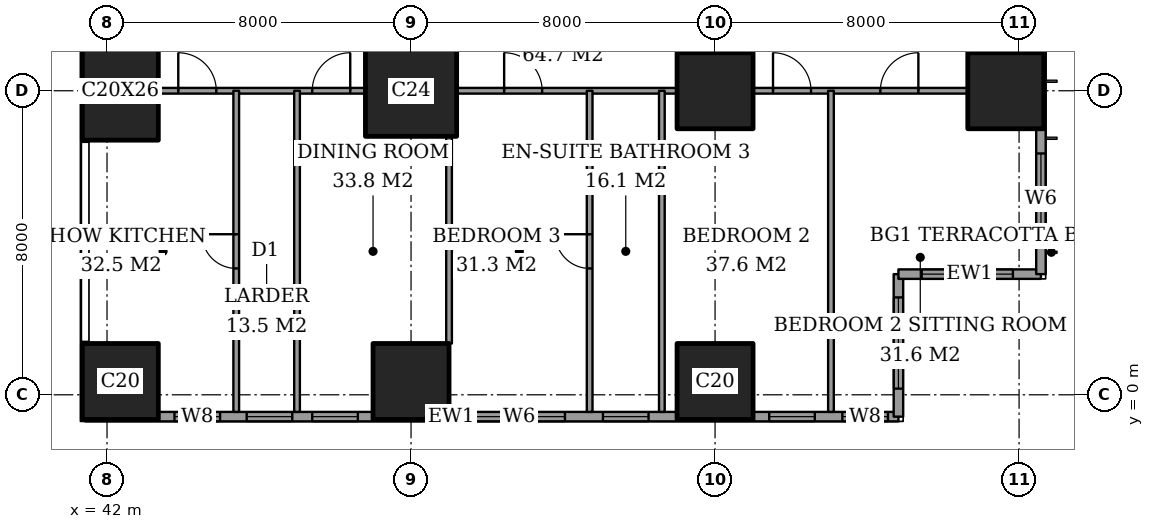
"""IFC4 building model, lengths in metres.
Left out: names, types, materials, properties, quantities, classifications, styles, units other than length and angle.
Written with IfcOpenShell. Run it as: python <this file> out.ifc"""

import sys

from ifc_helpers import new_model, si_unit, direction, frame, frame_2d, origin, origin_2d, place, context, subcontext, project, spatial, rectangle, extrude, element, fill, save


model = new_model("IFC4")
c1 = context("Model", 3, precision=1e-05, world=origin(), true_north=direction((0.0, 1.0)))
c2 = subcontext(c1, "Body", "Model", "MODEL_VIEW")
j1 = project(units=[si_unit("LENGTHUNIT", "METRE"), si_unit("PLANEANGLEUNIT", "RADIAN")], contexts=[c1])
p1 = place(None, origin())
s1 = spatial("IfcSite", under=j1, at=p1, CompositionType="ELEMENT")
p2 = place(p1, origin())
s2 = spatial("IfcBuilding", under=s1, at=p2, CompositionType="ELEMENT")
p3 = place(p2, frame((0.0, 0.0, 80.0)))
s3 = spatial("IfcBuildingStorey", under=s2, at=p3, CompositionType="ELEMENT", Elevation=80.0)
p4 = place(p3, frame((42.35, 0.35, 0.0), z_axis=(0.0, 0.0, 1.0), x_axis=(1.0, 0.0, 0.0)))
e1 = element("IfcColumn", 1, at=p4, inside=s3, PredefinedType="COLUMN", context=c2, shape_type="SweptSolid", body=[
    extrude(rectangle(XDim=2.0, YDim=2.0, at=origin_2d()), origin(), (0.0, 0.0, 1.0), 3.6),
])
p5 = place(p3, frame((42.35, 8.0, 0.0), z_axis=(0.0, 0.0, 1.0), x_axis=(1.0, 0.0, 0.0)))
e2 = element("IfcColumn", 2, at=p5, inside=s3, PredefinedType="COLUMN", context=c2, shape_type="SweptSolid", body=[
    extrude(rectangle(XDim=2.0, YDim=2.6, at=origin_2d()), origin(), (0.0, 0.0, 1.0), 3.6),
])
p6 = place(p3, frame((50.0, 0.35, 0.0), z_axis=(0.0, 0.0, 1.0), x_axis=(1.0, 0.0, 0.0)))
e3 = element("IfcColumn", 3, at=p6, inside=s3, PredefinedType="COLUMN", context=c2, shape_type="SweptSolid", body=[
    extrude(rectangle(XDim=2.0, YDim=2.0, at=origin_2d()), origin(), (0.0, 0.0, 1.0), 3.6),
])
p7 = place(p3, frame((50.0, 8.0, 0.0), z_axis=(0.0, 0.0, 1.0), x_axis=(1.0, 0.0, 0.0)))
e4 = element("IfcColumn", 4, at=p7, inside=s3, PredefinedType="COLUMN", context=c2, shape_type="SweptSolid", body=[
    extrude(rectangle(XDim=2.4, YDim=2.4, at=origin_2d()), origin(), (0.0, 0.0, 1.0), 3.6),
])
for number, where, z_axis, x_axis in (
    (5, (58.0, 0.35, 0.0), (0.0, 0.0, 1.0), (1.0, 0.0, 0.0)),
    (6, (58.0, 8.0, 0.0), (0.0, 0.0, 1.0), (1.0, 0.0, 0.0)),
    (7, (65.65, 8.0, 0.0), (0.0, 0.0, 1.0), (1.0, 0.0, 0.0)),
):
    element("IfcColumn", number, at=place(p3, frame(where, z_axis=z_axis, x_axis=x_axis)), inside=s3, PredefinedType="COLUMN", context=c2, shape_type="SweptSolid", body=[
        extrude(rectangle(XDim=2.0, YDim=2.0, at=origin_2d()), origin(), (0.0, 0.0, 1.0), 3.6),
    ])
p8 = place(p3, frame((41.425, -0.575, 0.0), z_axis=(0.0, 0.0, 1.0), x_axis=(1.0, 0.0, 0.0)))
e8 = element("IfcWall", 8, at=p8, inside=s3, PredefinedType="SOLIDWALL", context=c2, shape_type="SweptSolid", body=[
    extrude(rectangle(XDim=21.4, YDim=0.25, at=frame_2d((10.7, 0.0))), origin(), (0.0, 0.0, 1.0), 3.6),
])
p9 = place(p8, frame((2.35, 0.0, 0.6)))
e9 = element("IfcOpeningElement", 9, at=p9, cuts=e8, PredefinedType="OPENING", context=c2, shape_type="SweptSolid", body=[
    extrude(rectangle(XDim=1.2, YDim=2.0, at=frame_2d((0.6, 1.0))), frame((0.0, 0.135, 0.0), z_axis=(0.0, -1.0, 0.0), x_axis=(1.0, 0.0, 0.0)), (0.0, 0.0, 1.0), 0.27),
])
p10 = place(p8, frame((4.25, 0.0, 0.6)))
e10 = element("IfcOpeningElement", 10, at=p10, cuts=e8, PredefinedType="OPENING", context=c2, shape_type="SweptSolid", body=[
    extrude(rectangle(XDim=1.2, YDim=2.0, at=frame_2d((0.6, 1.0))), frame((0.0, 0.135, 0.0), z_axis=(0.0, -1.0, 0.0), x_axis=(1.0, 0.0, 0.0)), (0.0, 0.0, 1.0), 0.27),
])
p11 = place(p8, frame((5.975, 0.0, 0.6)))
e11 = element("IfcOpeningElement", 11, at=p11, cuts=e8, PredefinedType="OPENING", context=c2, shape_type="SweptSolid", body=[
    extrude(rectangle(XDim=1.2, YDim=2.0, at=frame_2d((0.6, 1.0))), frame((0.0, 0.135, 0.0), z_axis=(0.0, -1.0, 0.0), x_axis=(1.0, 0.0, 0.0)), (0.0, 0.0, 1.0), 0.27),
])
p12 = place(p8, frame((10.225, 0.0, 0.6)))
e12 = element("IfcOpeningElement", 12, at=p12, cuts=e8, PredefinedType="OPENING", context=c2, shape_type="SweptSolid", body=[
    extrude(rectangle(XDim=2.4, YDim=2.0, at=frame_2d((1.2, 1.0))), frame((0.0, 0.135, 0.0), z_axis=(0.0, -1.0, 0.0), x_axis=(1.0, 0.0, 0.0)), (0.0, 0.0, 1.0), 0.27),
])
p13 = place(p8, frame((13.625, 0.0, 0.6)))
e13 = element("IfcOpeningElement", 13, at=p13, cuts=e8, PredefinedType="OPENING", context=c2, shape_type="SweptSolid", body=[
    extrude(rectangle(XDim=1.2, YDim=2.0, at=frame_2d((0.6, 1.0))), frame((0.0, 0.135, 0.0), z_axis=(0.0, -1.0, 0.0), x_axis=(1.0, 0.0, 0.0)), (0.0, 0.0, 1.0), 0.27),
])
p14 = place(p8, frame((18.0, 0.0, 0.6)))
e14 = element("IfcOpeningElement", 14, at=p14, cuts=e8, PredefinedType="OPENING", context=c2, shape_type="SweptSolid", body=[
    extrude(rectangle(XDim=1.2, YDim=2.0, at=frame_2d((0.6, 1.0))), frame((0.0, 0.135, 0.0), z_axis=(0.0, -1.0, 0.0), x_axis=(1.0, 0.0, 0.0)), (0.0, 0.0, 1.0), 0.27),
])
p15 = place(p8, frame((19.925, 0.0, 0.6)))
e15 = element("IfcOpeningElement", 15, at=p15, cuts=e8, PredefinedType="OPENING", context=c2, shape_type="SweptSolid", body=[
    extrude(rectangle(XDim=1.2, YDim=2.0, at=frame_2d((0.6, 1.0))), frame((0.0, 0.135, 0.0), z_axis=(0.0, -1.0, 0.0), x_axis=(1.0, 0.0, 0.0)), (0.0, 0.0, 1.0), 0.27),
])
p16 = place(p3, frame((62.825, -0.575, 0.0), z_axis=(0.0, 0.0, 1.0), x_axis=(0.0, 1.0, 0.0)))
e16 = element("IfcWall", 16, at=p16, inside=s3, PredefinedType="SOLIDWALL", context=c2, shape_type="SweptSolid", body=[
    extrude(rectangle(XDim=3.75, YDim=0.25, at=frame_2d((1.875, 0.0))), origin(), (0.0, 0.0, 1.0), 3.6),
])
p17 = place(p16, frame((0.738, 0.0, 0.6)))
e17 = element("IfcOpeningElement", 17, at=p17, cuts=e16, PredefinedType="OPENING", context=c2, shape_type="SweptSolid", body=[
    extrude(rectangle(XDim=2.4, YDim=2.0, at=frame_2d((1.2, 1.0))), frame((0.0, 0.135, 0.0), z_axis=(0.0, -1.0, 0.0), x_axis=(1.0, 0.0, 0.0)), (0.0, 0.0, 1.0), 0.27),
])
p18 = place(p3, frame((62.825, 3.175, 0.0), z_axis=(0.0, 0.0, 1.0), x_axis=(1.0, 0.0, 0.0)))
e18 = element("IfcWall", 18, at=p18, inside=s3, PredefinedType="SOLIDWALL", context=c2, shape_type="SweptSolid", body=[
    extrude(rectangle(XDim=3.75, YDim=0.25, at=frame_2d((1.875, 0.0))), origin(), (0.0, 0.0, 1.0), 3.6),
])
p19 = place(p18, frame((0.613, 0.0, 0.6)))
e19 = element("IfcOpeningElement", 19, at=p19, cuts=e18, PredefinedType="OPENING", context=c2, shape_type="SweptSolid", body=[
    extrude(rectangle(XDim=2.4, YDim=2.0, at=frame_2d((1.2, 1.0))), frame((0.0, 0.135, 0.0), z_axis=(0.0, -1.0, 0.0), x_axis=(1.0, 0.0, 0.0)), (0.0, 0.0, 1.0), 0.27),
])
p20 = place(p3, frame((66.575, 3.175, 0.0), z_axis=(0.0, 0.0, 1.0), x_axis=(0.0, 1.0, 0.0)))
e20 = element("IfcWall", 20, at=p20, inside=s3, PredefinedType="SOLIDWALL", context=c2, shape_type="SweptSolid", body=[
    extrude(rectangle(XDim=41.65, YDim=0.25, at=frame_2d((20.825, 0.0))), origin(), (0.0, 0.0, 1.0), 3.6),
])
p21 = place(p20, frame((0.775, 0.0, 0.6)))
e21 = element("IfcOpeningElement", 21, at=p21, cuts=e20, PredefinedType="OPENING", context=c2, shape_type="SweptSolid", body=[
    extrude(rectangle(XDim=2.4, YDim=2.0, at=frame_2d((1.2, 1.0))), frame((0.0, 0.135, 0.0), z_axis=(0.0, -1.0, 0.0), x_axis=(1.0, 0.0, 0.0)), (0.0, 0.0, 1.0), 0.27),
])
p22 = place(p20, frame((6.1, 0.0, 0.6)))
e22 = element("IfcOpeningElement", 22, at=p22, cuts=e20, PredefinedType="OPENING", context=c2, shape_type="SweptSolid", body=[
    extrude(rectangle(XDim=1.2, YDim=2.0, at=frame_2d((0.6, 1.0))), frame((0.0, 0.135, 0.0), z_axis=(0.0, -1.0, 0.0), x_axis=(1.0, 0.0, 0.0)), (0.0, 0.0, 1.0), 0.27),
])
p23 = place(p20, frame((8.275, 0.0, 0.6)))
e23 = element("IfcOpeningElement", 23, at=p23, cuts=e20, PredefinedType="OPENING", context=c2, shape_type="SweptSolid", body=[
    extrude(rectangle(XDim=2.4, YDim=2.0, at=frame_2d((1.2, 1.0))), frame((0.0, 0.135, 0.0), z_axis=(0.0, -1.0, 0.0), x_axis=(1.0, 0.0, 0.0)), (0.0, 0.0, 1.0), 0.27),
])
p24 = place(p20, frame((15.775, 0.0, 0.6)))
e24 = element("IfcOpeningElement", 24, at=p24, cuts=e20, PredefinedType="OPENING", context=c2, shape_type="SweptSolid", body=[
    extrude(rectangle(XDim=2.4, YDim=2.0, at=frame_2d((1.2, 1.0))), frame((0.0, 0.135, 0.0), z_axis=(0.0, -1.0, 0.0), x_axis=(1.0, 0.0, 0.0)), (0.0, 0.0, 1.0), 0.27),
])
p25 = place(p20, frame((23.475, 0.0, 0.6)))
e25 = element("IfcOpeningElement", 25, at=p25, cuts=e20, PredefinedType="OPENING", context=c2, shape_type="SweptSolid", body=[
    extrude(rectangle(XDim=2.4, YDim=2.0, at=frame_2d((1.2, 1.0))), frame((0.0, 0.135, 0.0), z_axis=(0.0, -1.0, 0.0), x_axis=(1.0, 0.0, 0.0)), (0.0, 0.0, 1.0), 0.27),
])
p26 = place(p20, frame((30.975, 0.0, 0.6)))
e26 = element("IfcOpeningElement", 26, at=p26, cuts=e20, PredefinedType="OPENING", context=c2, shape_type="SweptSolid", body=[
    extrude(rectangle(XDim=2.4, YDim=2.0, at=frame_2d((1.2, 1.0))), frame((0.0, 0.135, 0.0), z_axis=(0.0, -1.0, 0.0), x_axis=(1.0, 0.0, 0.0)), (0.0, 0.0, 1.0), 0.27),
])
p27 = place(p20, frame((34.5, 0.0, 0.6)))
e27 = element("IfcOpeningElement", 27, at=p27, cuts=e20, PredefinedType="OPENING", context=c2, shape_type="SweptSolid", body=[
    extrude(rectangle(XDim=1.2, YDim=2.0, at=frame_2d((0.6, 1.0))), frame((0.0, 0.135, 0.0), z_axis=(0.0, -1.0, 0.0), x_axis=(1.0, 0.0, 0.0)), (0.0, 0.0, 1.0), 0.27),
])
p28 = place(p20, frame((38.475, 0.0, 0.6)))
e28 = element("IfcOpeningElement", 28, at=p28, cuts=e20, PredefinedType="OPENING", context=c2, shape_type="SweptSolid", body=[
    extrude(rectangle(XDim=2.4, YDim=2.0, at=frame_2d((1.2, 1.0))), frame((0.0, 0.135, 0.0), z_axis=(0.0, -1.0, 0.0), x_axis=(1.0, 0.0, 0.0)), (0.0, 0.0, 1.0), 0.27),
])
p29 = place(p3, frame((43.35, 8.0, 0.0), z_axis=(0.0, 0.0, 1.0), x_axis=(1.0, 0.0, 0.0)))
e29 = element("IfcWall", 29, at=p29, inside=s3, PredefinedType="PARTITIONING", context=c2, shape_type="SweptSolid", body=[
    extrude(rectangle(XDim=5.45, YDim=0.15, at=frame_2d((2.725, 0.0))), origin(), (0.0, 0.0, 1.0), 3.35),
])
p30 = place(p29, frame((4.05, 0.0, 0.0)))
e30 = element("IfcOpeningElement", 30, at=p30, cuts=e29, PredefinedType="OPENING", context=c2, shape_type="SweptSolid", body=[
    extrude(rectangle(XDim=1.0, YDim=2.1, at=frame_2d((0.5, 1.05))), frame((0.0, 0.085, 0.0), z_axis=(0.0, -1.0, 0.0), x_axis=(1.0, 0.0, 0.0)), (0.0, 0.0, 1.0), 0.17),
])
p31 = place(p29, frame((0.525, 0.0, 0.0)))
e31 = element("IfcOpeningElement", 31, at=p31, cuts=e29, PredefinedType="OPENING", context=c2, shape_type="SweptSolid", body=[
    extrude(rectangle(XDim=1.0, YDim=2.1, at=frame_2d((0.5, 1.05))), frame((0.0, 0.085, 0.0), z_axis=(0.0, -1.0, 0.0), x_axis=(1.0, 0.0, 0.0)), (0.0, 0.0, 1.0), 0.17),
])
p32 = place(p3, frame((51.2, 8.0, 0.0), z_axis=(0.0, 0.0, 1.0), x_axis=(1.0, 0.0, 0.0)))
e32 = element("IfcWall", 32, at=p32, inside=s3, PredefinedType="PARTITIONING", context=c2, shape_type="SweptSolid", body=[
    extrude(rectangle(XDim=5.8, YDim=0.15, at=frame_2d((2.9, 0.0))), origin(), (0.0, 0.0, 1.0), 3.35),
])
p33 = place(p32, frame((1.25, 0.0, 0.0)))
e33 = element("IfcOpeningElement", 33, at=p33, cuts=e32, PredefinedType="OPENING", context=c2, shape_type="SweptSolid", body=[
    extrude(rectangle(XDim=1.0, YDim=2.1, at=frame_2d((0.5, 1.05))), frame((0.0, 0.085, 0.0), z_axis=(0.0, -1.0, 0.0), x_axis=(1.0, 0.0, 0.0)), (0.0, 0.0, 1.0), 0.17),
])
p34 = place(p3, frame((59.0, 8.0, 0.0), z_axis=(0.0, 0.0, 1.0), x_axis=(1.0, 0.0, 0.0)))
e34 = element("IfcWall", 34, at=p34, inside=s3, PredefinedType="PARTITIONING", context=c2, shape_type="SweptSolid", body=[
    extrude(rectangle(XDim=5.65, YDim=0.15, at=frame_2d((2.825, 0.0))), origin(), (0.0, 0.0, 1.0), 3.35),
])
p35 = place(p34, frame((3.35, 0.0, 0.0)))
e35 = element("IfcOpeningElement", 35, at=p35, cuts=e34, PredefinedType="OPENING", context=c2, shape_type="SweptSolid", body=[
    extrude(rectangle(XDim=1.0, YDim=2.1, at=frame_2d((0.5, 1.05))), frame((0.0, 0.085, 0.0), z_axis=(0.0, -1.0, 0.0), x_axis=(1.0, 0.0, 0.0)), (0.0, 0.0, 1.0), 0.17),
])
p36 = place(p34, frame((0.525, 0.0, 0.0)))
e36 = element("IfcOpeningElement", 36, at=p36, cuts=e34, PredefinedType="OPENING", context=c2, shape_type="SweptSolid", body=[
    extrude(rectangle(XDim=1.0, YDim=2.1, at=frame_2d((0.5, 1.05))), frame((0.0, 0.085, 0.0), z_axis=(0.0, -1.0, 0.0), x_axis=(1.0, 0.0, 0.0)), (0.0, 0.0, 1.0), 0.17),
])
p37 = place(p3, frame((45.4, -0.45, 0.0), z_axis=(0.0, 0.0, 1.0), x_axis=(0.0, 1.0, 0.0)))
e37 = element("IfcWall", 37, at=p37, inside=s3, PredefinedType="PARTITIONING", context=c2, shape_type="SweptSolid", body=[
    extrude(rectangle(XDim=8.45, YDim=0.15, at=frame_2d((4.225, 0.0))), origin(), (0.0, 0.0, 1.0), 3.35),
])
p38 = place(p37, frame((3.775, 0.0, 0.0)))
e38 = element("IfcOpeningElement", 38, at=p38, cuts=e37, PredefinedType="OPENING", context=c2, shape_type="SweptSolid", body=[
    extrude(rectangle(XDim=0.9, YDim=2.1, at=frame_2d((0.45, 1.05))), frame((0.0, 0.085, 0.0), z_axis=(0.0, -1.0, 0.0), x_axis=(1.0, 0.0, 0.0)), (0.0, 0.0, 1.0), 0.17),
])
p39 = place(p3, frame((47.0, -0.45, 0.0), z_axis=(0.0, 0.0, 1.0), x_axis=(0.0, 1.0, 0.0)))
e39 = element("IfcWall", 39, at=p39, inside=s3, PredefinedType="PARTITIONING", context=c2, shape_type="SweptSolid", body=[
    extrude(rectangle(XDim=8.45, YDim=0.15, at=frame_2d((4.225, 0.0))), origin(), (0.0, 0.0, 1.0), 3.35),
])
p40 = place(p3, frame((51.0, 1.35, 0.0), z_axis=(0.0, 0.0, 1.0), x_axis=(0.0, 1.0, 0.0)))
e40 = element("IfcWall", 40, at=p40, inside=s3, PredefinedType="PARTITIONING", context=c2, shape_type="SweptSolid", body=[
    extrude(rectangle(XDim=5.45, YDim=0.15, at=frame_2d((2.725, 0.0))), origin(), (0.0, 0.0, 1.0), 3.35),
])
p41 = place(p3, frame((54.7, -0.45, 0.0), z_axis=(0.0, 0.0, 1.0), x_axis=(0.0, 1.0, 0.0)))
e41 = element("IfcWall", 41, at=p41, inside=s3, PredefinedType="PARTITIONING", context=c2, shape_type="SweptSolid", body=[
    extrude(rectangle(XDim=8.45, YDim=0.15, at=frame_2d((4.225, 0.0))), origin(), (0.0, 0.0, 1.0), 3.35),
])
p42 = place(p41, frame((3.775, 0.0, 0.0)))
e42 = element("IfcOpeningElement", 42, at=p42, cuts=e41, PredefinedType="OPENING", context=c2, shape_type="SweptSolid", body=[
    extrude(rectangle(XDim=0.9, YDim=2.1, at=frame_2d((0.45, 1.05))), frame((0.0, 0.085, 0.0), z_axis=(0.0, -1.0, 0.0), x_axis=(1.0, 0.0, 0.0)), (0.0, 0.0, 1.0), 0.17),
])
for number, where, z_axis, x_axis in (
    (43, (56.6, -0.45, 0.0), (0.0, 0.0, 1.0), (0.0, 1.0, 0.0)),
    (44, (61.05, -0.45, 0.0), (0.0, 0.0, 1.0), (0.0, 1.0, 0.0)),
):
    element("IfcWall", number, at=place(p3, frame(where, z_axis=z_axis, x_axis=x_axis)), inside=s3, PredefinedType="PARTITIONING", context=c2, shape_type="SweptSolid", body=[
        extrude(rectangle(XDim=8.45, YDim=0.15, at=frame_2d((4.225, 0.0))), origin(), (0.0, 0.0, 1.0), 3.35),
    ])
p43 = place(p9, origin())
e45 = element("IfcWindow", 45, at=p43, inside=s3, PartitioningType="SINGLE_PANEL", PredefinedType="WINDOW", context=c2, shape_type="SweptSolid", body=[
    extrude(rectangle(XDim=1.2, YDim=2.0, at=frame_2d((0.6, 1.0))), frame((0.0, 0.03, 0.0), z_axis=(0.0, -1.0, 0.0), x_axis=(1.0, 0.0, 0.0)), (0.0, 0.0, 1.0), 0.06),
])
fill(e9, e45)
p44 = place(p10, origin())
e46 = element("IfcWindow", 46, at=p44, inside=s3, PartitioningType="SINGLE_PANEL", PredefinedType="WINDOW", context=c2, shape_type="SweptSolid", body=[
    extrude(rectangle(XDim=1.2, YDim=2.0, at=frame_2d((0.6, 1.0))), frame((0.0, 0.03, 0.0), z_axis=(0.0, -1.0, 0.0), x_axis=(1.0, 0.0, 0.0)), (0.0, 0.0, 1.0), 0.06),
])
fill(e10, e46)
p45 = place(p11, origin())
e47 = element("IfcWindow", 47, at=p45, inside=s3, PartitioningType="SINGLE_PANEL", PredefinedType="WINDOW", context=c2, shape_type="SweptSolid", body=[
    extrude(rectangle(XDim=1.2, YDim=2.0, at=frame_2d((0.6, 1.0))), frame((0.0, 0.03, 0.0), z_axis=(0.0, -1.0, 0.0), x_axis=(1.0, 0.0, 0.0)), (0.0, 0.0, 1.0), 0.06),
])
fill(e11, e47)
p46 = place(p12, origin())
e48 = element("IfcWindow", 48, at=p46, inside=s3, PartitioningType="SINGLE_PANEL", PredefinedType="WINDOW", context=c2, shape_type="SweptSolid", body=[
    extrude(rectangle(XDim=2.4, YDim=2.0, at=frame_2d((1.2, 1.0))), frame((0.0, 0.03, 0.0), z_axis=(0.0, -1.0, 0.0), x_axis=(1.0, 0.0, 0.0)), (0.0, 0.0, 1.0), 0.06),
])
fill(e12, e48)
p47 = place(p13, origin())
e49 = element("IfcWindow", 49, at=p47, inside=s3, PartitioningType="SINGLE_PANEL", PredefinedType="WINDOW", context=c2, shape_type="SweptSolid", body=[
    extrude(rectangle(XDim=1.2, YDim=2.0, at=frame_2d((0.6, 1.0))), frame((0.0, 0.03, 0.0), z_axis=(0.0, -1.0, 0.0), x_axis=(1.0, 0.0, 0.0)), (0.0, 0.0, 1.0), 0.06),
])
fill(e13, e49)
p48 = place(p14, origin())
e50 = element("IfcWindow", 50, at=p48, inside=s3, PartitioningType="SINGLE_PANEL", PredefinedType="WINDOW", context=c2, shape_type="SweptSolid", body=[
    extrude(rectangle(XDim=1.2, YDim=2.0, at=frame_2d((0.6, 1.0))), frame((0.0, 0.03, 0.0), z_axis=(0.0, -1.0, 0.0), x_axis=(1.0, 0.0, 0.0)), (0.0, 0.0, 1.0), 0.06),
])
fill(e14, e50)
p49 = place(p15, origin())
e51 = element("IfcWindow", 51, at=p49, inside=s3, PartitioningType="SINGLE_PANEL", PredefinedType="WINDOW", context=c2, shape_type="SweptSolid", body=[
    extrude(rectangle(XDim=1.2, YDim=2.0, at=frame_2d((0.6, 1.0))), frame((0.0, 0.03, 0.0), z_axis=(0.0, -1.0, 0.0), x_axis=(1.0, 0.0, 0.0)), (0.0, 0.0, 1.0), 0.06),
])
fill(e15, e51)
p50 = place(p17, origin())
e52 = element("IfcWindow", 52, at=p50, inside=s3, PartitioningType="SINGLE_PANEL", PredefinedType="WINDOW", context=c2, shape_type="SweptSolid", body=[
    extrude(rectangle(XDim=2.4, YDim=2.0, at=frame_2d((1.2, 1.0))), frame((0.0, 0.03, 0.0), z_axis=(0.0, -1.0, 0.0), x_axis=(1.0, 0.0, 0.0)), (0.0, 0.0, 1.0), 0.06),
])
fill(e17, e52)
p51 = place(p19, origin())
e53 = element("IfcWindow", 53, at=p51, inside=s3, PartitioningType="SINGLE_PANEL", PredefinedType="WINDOW", context=c2, shape_type="SweptSolid", body=[
    extrude(rectangle(XDim=2.4, YDim=2.0, at=frame_2d((1.2, 1.0))), frame((0.0, 0.03, 0.0), z_axis=(0.0, -1.0, 0.0), x_axis=(1.0, 0.0, 0.0)), (0.0, 0.0, 1.0), 0.06),
])
fill(e19, e53)
p52 = place(p21, origin())
e54 = element("IfcWindow", 54, at=p52, inside=s3, PartitioningType="SINGLE_PANEL", PredefinedType="WINDOW", context=c2, shape_type="SweptSolid", body=[
    extrude(rectangle(XDim=2.4, YDim=2.0, at=frame_2d((1.2, 1.0))), frame((0.0, 0.03, 0.0), z_axis=(0.0, -1.0, 0.0), x_axis=(1.0, 0.0, 0.0)), (0.0, 0.0, 1.0), 0.06),
])
fill(e21, e54)
p53 = place(p35, origin())
e55 = element("IfcDoor", 55, at=p53, inside=s3, OperationType="SINGLE_SWING_LEFT", PredefinedType="DOOR", context=c2, shape_type="SweptSolid", body=[
    extrude(rectangle(XDim=1.0, YDim=2.1, at=frame_2d((0.5, 1.05))), frame((0.0, 0.025, 0.0), z_axis=(0.0, -1.0, 0.0), x_axis=(1.0, 0.0, 0.0)), (0.0, 0.0, 1.0), 0.05),
])
fill(e35, e55)
p54 = place(p36, origin())
e56 = element("IfcDoor", 56, at=p54, inside=s3, OperationType="SINGLE_SWING_RIGHT", PredefinedType="DOOR", context=c2, shape_type="SweptSolid", body=[
    extrude(rectangle(XDim=1.0, YDim=2.1, at=frame_2d((0.5, 1.05))), frame((0.0, 0.025, 0.0), z_axis=(0.0, -1.0, 0.0), x_axis=(1.0, 0.0, 0.0)), (0.0, 0.0, 1.0), 0.05),
])
fill(e36, e56)
p55 = place(p42, origin())
e57 = element("IfcDoor", 57, at=p55, inside=s3, OperationType="SINGLE_SWING_LEFT", PredefinedType="DOOR", context=c2, shape_type="SweptSolid", body=[
    extrude(rectangle(XDim=0.9, YDim=2.1, at=frame_2d((0.45, 1.05))), frame((0.0, 0.025, 0.0), z_axis=(0.0, -1.0, 0.0), x_axis=(1.0, 0.0, 0.0)), (0.0, 0.0, 1.0), 0.05),
])
fill(e42, e57)
p56 = place(p33, origin())
e58 = element("IfcDoor", 58, at=p56, inside=s3, OperationType="SINGLE_SWING_RIGHT", PredefinedType="DOOR", context=c2, shape_type="SweptSolid", body=[
    extrude(rectangle(XDim=1.0, YDim=2.1, at=frame_2d((0.5, 1.05))), frame((0.0, 0.025, 0.0), z_axis=(0.0, -1.0, 0.0), x_axis=(1.0, 0.0, 0.0)), (0.0, 0.0, 1.0), 0.05),
])
fill(e33, e58)
p57 = place(p30, origin())
e59 = element("IfcDoor", 59, at=p57, inside=s3, OperationType="SINGLE_SWING_LEFT", PredefinedType="DOOR", context=c2, shape_type="SweptSolid", body=[
    extrude(rectangle(XDim=1.0, YDim=2.1, at=frame_2d((0.5, 1.05))), frame((0.0, 0.025, 0.0), z_axis=(0.0, -1.0, 0.0), x_axis=(1.0, 0.0, 0.0)), (0.0, 0.0, 1.0), 0.05),
])
fill(e30, e59)
p58 = place(p38, origin())
e60 = element("IfcDoor", 60, at=p58, inside=s3, OperationType="SINGLE_SWING_LEFT", PredefinedType="DOOR", context=c2, shape_type="SweptSolid", body=[
    extrude(rectangle(XDim=0.9, YDim=2.1, at=frame_2d((0.45, 1.05))), frame((0.0, 0.025, 0.0), z_axis=(0.0, -1.0, 0.0), x_axis=(1.0, 0.0, 0.0)), (0.0, 0.0, 1.0), 0.05),
])
fill(e38, e60)
p59 = place(p31, origin())
e61 = element("IfcDoor", 61, at=p59, inside=s3, OperationType="SINGLE_SWING_RIGHT", PredefinedType="DOOR", context=c2, shape_type="SweptSolid", body=[
    extrude(rectangle(XDim=1.0, YDim=2.1, at=frame_2d((0.5, 1.05))), frame((0.0, 0.025, 0.0), z_axis=(0.0, -1.0, 0.0), x_axis=(1.0, 0.0, 0.0)), (0.0, 0.0, 1.0), 0.05),
])
fill(e31, e61)
save(model, sys.argv[1])
